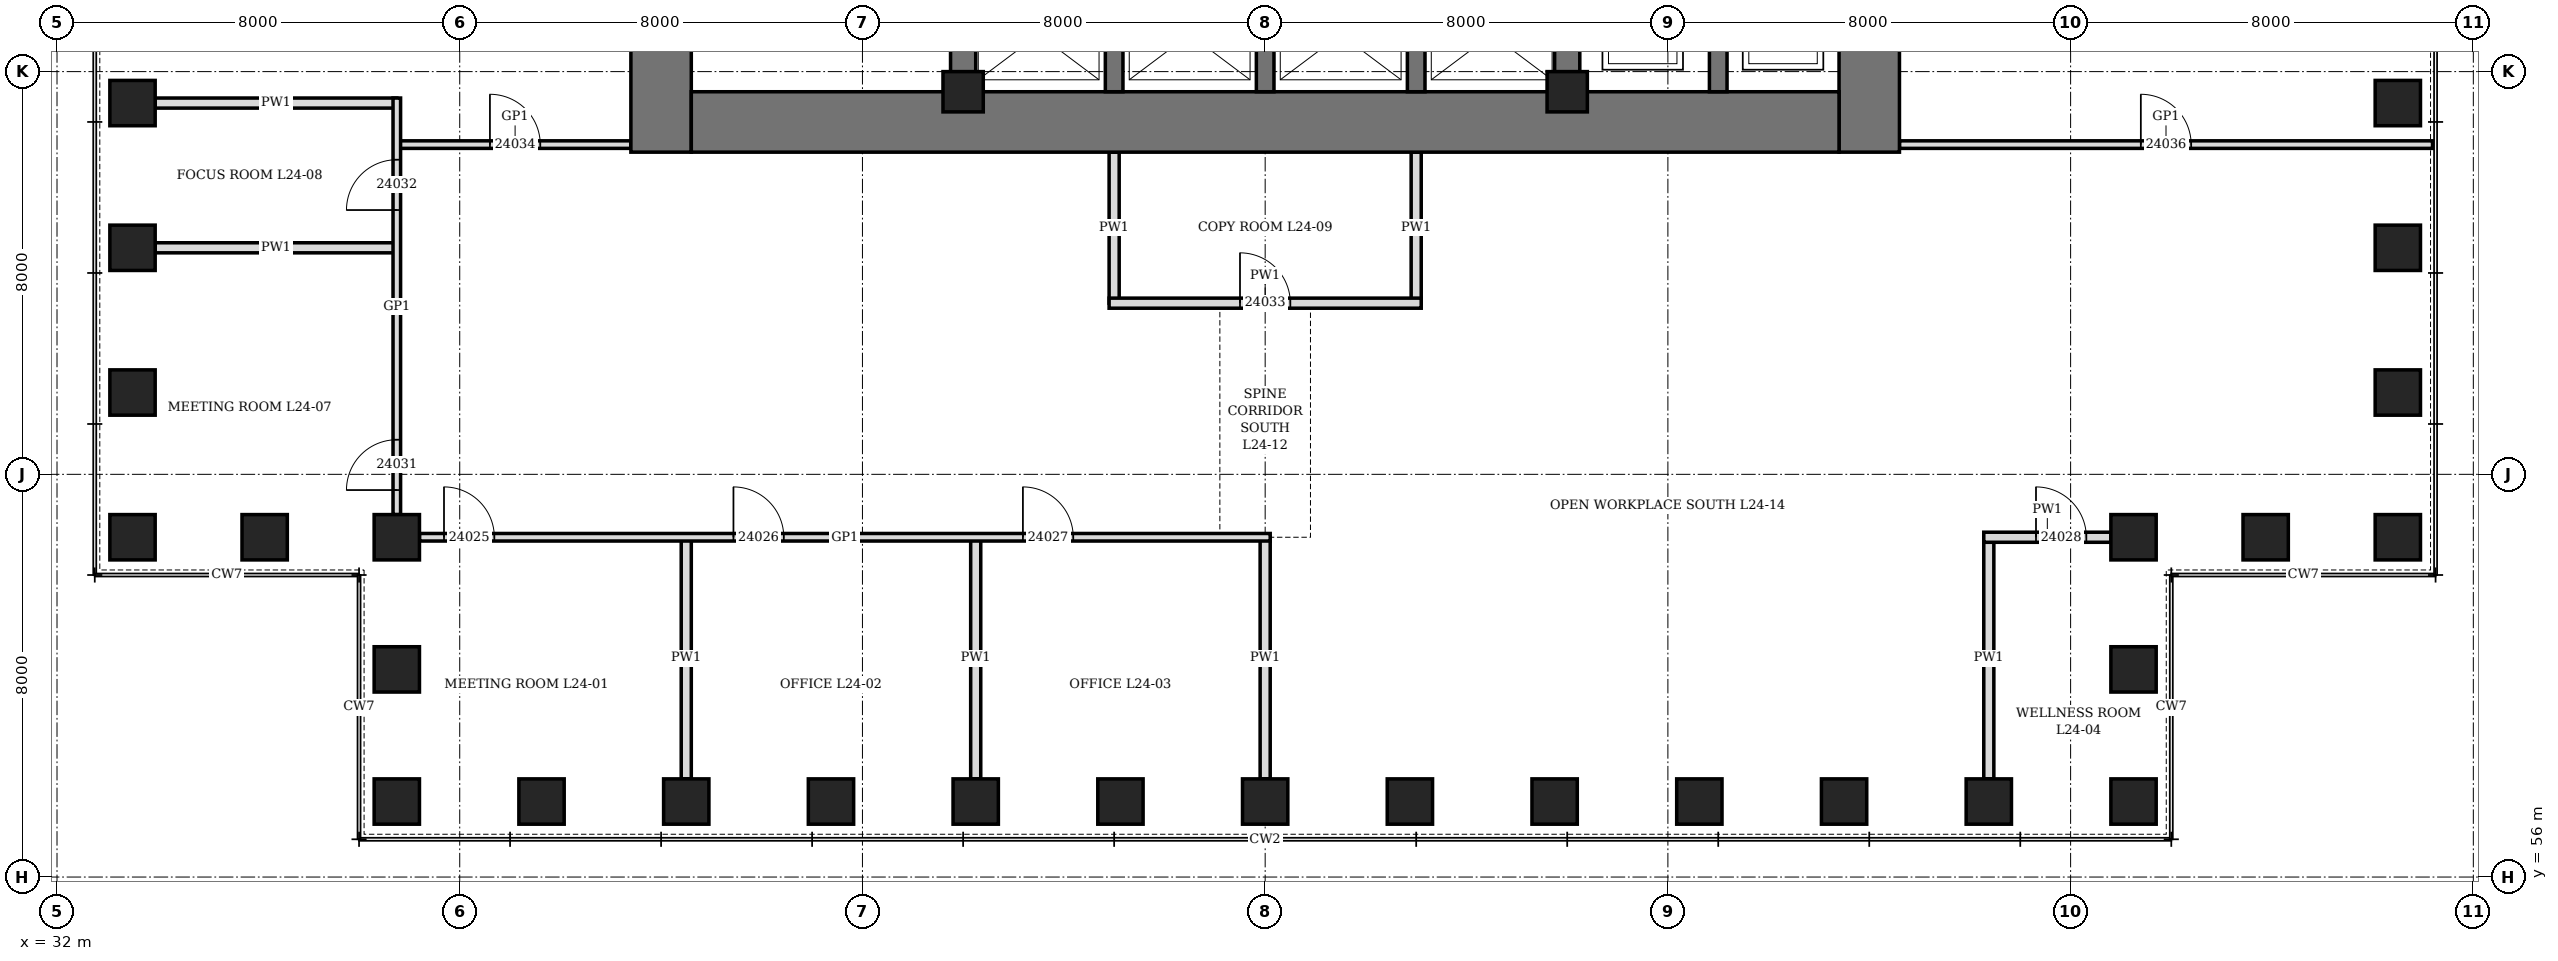
"""IFC4 building model, lengths in metres.
Left out: names, types, materials, properties, quantities, classifications, styles, units other than length and angle.
Written with IfcOpenShell. Run it as: python <this file> out.ifc"""

import sys

from ifc_helpers import new_model, si_unit, direction, frame, frame_2d, origin, origin_2d, place, context, subcontext, project, spatial, rectangle, hollow_rectangle, extrude, element, fill, save


model = new_model("IFC4")
c1 = context("Model", 3, precision=1e-05, world=origin(), true_north=direction((0.0, 1.0)))
c2 = subcontext(c1, "Body", "Model", "MODEL_VIEW")
j1 = project(units=[si_unit("LENGTHUNIT", "METRE"), si_unit("PLANEANGLEUNIT", "RADIAN")], contexts=[c1])
p1 = place(None, origin())
s1 = spatial("IfcSite", under=j1, at=p1, CompositionType="ELEMENT")
p2 = place(p1, origin())
s2 = spatial("IfcBuilding", under=s1, at=p2, CompositionType="ELEMENT")
p3 = place(p2, frame((0.0, 0.0, 112.3)))
s3 = spatial("IfcBuildingStorey", under=s2, at=p3, CompositionType="ELEMENT", Elevation=112.3)
for number, where, z_axis, x_axis in (
    (1, (38.75, 57.5, 0.0), (0.0, 0.0, 1.0), (1.0, 0.0, 0.0)),
    (2, (41.625, 57.5, 0.0), (0.0, 0.0, 1.0), (1.0, 0.0, 0.0)),
    (3, (44.5, 57.5, 0.0), (0.0, 0.0, 1.0), (1.0, 0.0, 0.0)),
    (4, (47.375, 57.5, 0.0), (0.0, 0.0, 1.0), (1.0, 0.0, 0.0)),
    (5, (50.25, 57.5, 0.0), (0.0, 0.0, 1.0), (1.0, 0.0, 0.0)),
    (6, (53.125, 57.5, 0.0), (0.0, 0.0, 1.0), (1.0, 0.0, 0.0)),
    (7, (56.0, 57.5, 0.0), (0.0, 0.0, 1.0), (1.0, 0.0, 0.0)),
    (8, (58.875, 57.5, 0.0), (0.0, 0.0, 1.0), (1.0, 0.0, 0.0)),
    (9, (61.75, 57.5, 0.0), (0.0, 0.0, 1.0), (1.0, 0.0, 0.0)),
    (10, (64.625, 57.5, 0.0), (0.0, 0.0, 1.0), (1.0, 0.0, 0.0)),
    (11, (67.5, 57.5, 0.0), (0.0, 0.0, 1.0), (1.0, 0.0, 0.0)),
    (12, (70.375, 57.5, 0.0), (0.0, 0.0, 1.0), (1.0, 0.0, 0.0)),
    (13, (73.25, 57.5, 0.0), (0.0, 0.0, 1.0), (0.0, 1.0, 0.0)),
    (14, (73.25, 60.125, 0.0), (0.0, 0.0, 1.0), (0.0, 1.0, 0.0)),
    (15, (73.25, 62.75, 0.0), (0.0, 0.0, 1.0), (1.0, 0.0, 0.0)),
    (16, (75.875, 62.75, 0.0), (0.0, 0.0, 1.0), (1.0, 0.0, 0.0)),
    (17, (78.5, 62.75, 0.0), (0.0, 0.0, 1.0), (0.0, 1.0, 0.0)),
    (18, (78.5, 65.625, 0.0), (0.0, 0.0, 1.0), (0.0, 1.0, 0.0)),
    (19, (78.5, 68.5, 0.0), (0.0, 0.0, 1.0), (0.0, 1.0, 0.0)),
    (20, (78.5, 71.375, 0.0), (0.0, 0.0, 1.0), (0.0, 1.0, 0.0)),
    (21, (33.5, 71.375, 0.0), (0.0, 0.0, 1.0), (0.0, 1.0, 0.0)),
    (22, (33.5, 68.5, 0.0), (0.0, 0.0, 1.0), (0.0, 1.0, 0.0)),
    (23, (33.5, 65.625, 0.0), (0.0, 0.0, 1.0), (0.0, 1.0, 0.0)),
    (24, (33.5, 62.75, 0.0), (0.0, 0.0, 1.0), (1.0, 0.0, 0.0)),
    (25, (36.125, 62.75, 0.0), (0.0, 0.0, 1.0), (1.0, 0.0, 0.0)),
    (26, (38.75, 62.75, 0.0), (0.0, 0.0, 1.0), (0.0, 1.0, 0.0)),
    (27, (38.75, 60.125, 0.0), (0.0, 0.0, 1.0), (0.0, 1.0, 0.0)),
):
    element("IfcColumn", number, at=place(p3, frame(where, z_axis=z_axis, x_axis=x_axis)), inside=s3, PredefinedType="COLUMN", context=c2, shape_type="SweptSolid", body=[
        extrude(hollow_rectangle(XDim=0.9, YDim=0.9, WallThickness=0.15, at=origin_2d()), origin(), (0.0, 0.0, 1.0), 4.2),
    ])
p4 = place(p3, frame((44.0, 70.4, 0.0), z_axis=(0.0, 0.0, 1.0), x_axis=(0.0, 1.0, 0.0)))
e28 = element("IfcWall", 28, at=p4, inside=s3, PredefinedType="SHEAR", context=c2, shape_type="SweptSolid", body=[
    extrude(rectangle(XDim=19.2, YDim=1.2, at=frame_2d((9.6, 0.0))), origin(), (0.0, 0.0, 1.0), 4.2),
])
p5 = place(p4, frame((8.6, 0.0, 0.0)))
e29 = element("IfcOpeningElement", 29, at=p5, cuts=e28, PredefinedType="OPENING", context=c2, shape_type="SweptSolid", body=[
    extrude(rectangle(XDim=2.0, YDim=2.4, at=frame_2d((1.0, 1.2))), frame((0.0, 0.61, 0.0), z_axis=(0.0, -1.0, 0.0), x_axis=(1.0, 0.0, 0.0)), (0.0, 0.0, 1.0), 1.22),
])
p6 = place(p3, frame((68.0, 70.4, 0.0), z_axis=(0.0, 0.0, 1.0), x_axis=(0.0, 1.0, 0.0)))
e30 = element("IfcWall", 30, at=p6, inside=s3, PredefinedType="SHEAR", context=c2, shape_type="SweptSolid", body=[
    extrude(rectangle(XDim=19.2, YDim=1.2, at=frame_2d((9.6, 0.0))), origin(), (0.0, 0.0, 1.0), 4.2),
])
p7 = place(p6, frame((8.6, 0.0, 0.0)))
e31 = element("IfcOpeningElement", 31, at=p7, cuts=e30, PredefinedType="OPENING", context=c2, shape_type="SweptSolid", body=[
    extrude(rectangle(XDim=2.0, YDim=2.4, at=frame_2d((1.0, 1.2))), frame((0.0, 0.61, 0.0), z_axis=(0.0, -1.0, 0.0), x_axis=(1.0, 0.0, 0.0)), (0.0, 0.0, 1.0), 1.22),
])
p8 = place(p3, frame((44.6, 71.0, 0.0), z_axis=(0.0, 0.0, 1.0), x_axis=(1.0, 0.0, 0.0)))
e32 = element("IfcWall", 32, at=p8, inside=s3, PredefinedType="SHEAR", context=c2, shape_type="SweptSolid", body=[
    extrude(rectangle(XDim=22.8, YDim=1.2, at=frame_2d((11.4, 0.0))), origin(), (0.0, 0.0, 1.0), 4.2),
])
p9 = place(p3, frame((50.0, 71.6, 0.0), z_axis=(0.0, 0.0, 1.0), x_axis=(0.0, 1.0, 0.0)))
e33 = element("IfcWall", 33, at=p9, inside=s3, PredefinedType="SHEAR", context=c2, shape_type="SweptSolid", body=[
    extrude(rectangle(XDim=16.8, YDim=0.5, at=frame_2d((8.4, 0.0))), origin(), (0.0, 0.0, 1.0), 4.2),
])
p10 = place(p9, frame((7.5, 0.0, 0.0)))
e34 = element("IfcOpeningElement", 34, at=p10, cuts=e33, PredefinedType="OPENING", context=c2, shape_type="SweptSolid", body=[
    extrude(rectangle(XDim=1.8, YDim=2.4, at=frame_2d((0.9, 1.2))), frame((0.0, 0.26, 0.0), z_axis=(0.0, -1.0, 0.0), x_axis=(1.0, 0.0, 0.0)), (0.0, 0.0, 1.0), 0.52),
])
p11 = place(p3, frame((62.0, 71.6, 0.0), z_axis=(0.0, 0.0, 1.0), x_axis=(0.0, 1.0, 0.0)))
e35 = element("IfcWall", 35, at=p11, inside=s3, PredefinedType="SHEAR", context=c2, shape_type="SweptSolid", body=[
    extrude(rectangle(XDim=16.8, YDim=0.5, at=frame_2d((8.4, 0.0))), origin(), (0.0, 0.0, 1.0), 4.2),
])
p12 = place(p11, frame((7.5, 0.0, 0.0)))
e36 = element("IfcOpeningElement", 36, at=p12, cuts=e35, PredefinedType="OPENING", context=c2, shape_type="SweptSolid", body=[
    extrude(rectangle(XDim=1.8, YDim=2.4, at=frame_2d((0.9, 1.2))), frame((0.0, 0.26, 0.0), z_axis=(0.0, -1.0, 0.0), x_axis=(1.0, 0.0, 0.0)), (0.0, 0.0, 1.0), 0.52),
])
for number, where, z_axis, x_axis in (
    (37, (53.0, 71.6, 0.0), (0.0, 0.0, 1.0), (0.0, 1.0, 0.0)),
    (38, (56.0, 71.6, 0.0), (0.0, 0.0, 1.0), (0.0, 1.0, 0.0)),
    (39, (59.0, 71.6, 0.0), (0.0, 0.0, 1.0), (0.0, 1.0, 0.0)),
):
    element("IfcWall", number, at=place(p3, frame(where, z_axis=z_axis, x_axis=x_axis)), inside=s3, PredefinedType="SHEAR", context=c2, shape_type="SweptSolid", body=[
        extrude(rectangle(XDim=2.225, YDim=0.35, at=frame_2d((1.112, 0.0))), origin(), (0.0, 0.0, 1.0), 4.2),
    ])
p13 = place(p3, frame((65.0, 71.6, 0.0), z_axis=(0.0, 0.0, 1.0), x_axis=(0.0, 1.0, 0.0)))
e40 = element("IfcWall", 40, at=p13, inside=s3, PredefinedType="SHEAR", context=c2, shape_type="SweptSolid", body=[
    extrude(rectangle(XDim=3.15, YDim=0.35, at=frame_2d((1.575, 0.0))), origin(), (0.0, 0.0, 1.0), 4.2),
])
for number, where, z_axis, x_axis in (
    (41, (50.0, 71.6, 0.0), (0.0, 0.0, 1.0), (1.0, 0.0, 0.0)),
    (42, (62.0, 71.6, 0.0), (0.0, 0.0, 1.0), (1.0, 0.0, 0.0)),
):
    element("IfcColumn", number, at=place(p3, frame(where, z_axis=z_axis, x_axis=x_axis)), inside=s3, PredefinedType="COLUMN", context=c2, shape_type="SweptSolid", body=[
        extrude(hollow_rectangle(XDim=0.8, YDim=0.8, WallThickness=0.1, at=origin_2d()), origin(), (0.0, 0.0, 1.0), 4.2),
    ])
p14 = place(p3, frame((44.5, 57.95, 0.0), z_axis=(0.0, 0.0, 1.0), x_axis=(0.0, 1.0, 0.0)))
e43 = element("IfcWall", 43, at=p14, inside=s3, PredefinedType="PARTITIONING", context=c2, shape_type="SweptSolid", body=[
    extrude(rectangle(XDim=4.8, YDim=0.2, at=frame_2d((2.4, 0.0))), origin(), (0.0, 0.0, 1.0), 2.74),
])
for number, where, z_axis, x_axis in (
    (44, (50.25, 57.95, 0.0), (0.0, 0.0, 1.0), (0.0, 1.0, 0.0)),
    (45, (56.0, 57.95, 0.0), (0.0, 0.0, 1.0), (0.0, 1.0, 0.0)),
):
    element("IfcWall", number, at=place(p3, frame(where, z_axis=z_axis, x_axis=x_axis)), inside=s3, PredefinedType="PARTITIONING", context=c2, shape_type="SweptSolid", body=[
        extrude(rectangle(XDim=4.8, YDim=0.2, at=frame_2d((2.4, 0.0))), origin(), (0.0, 0.0, 1.0), 3.278),
    ])
for number, where, z_axis, x_axis in (
    (46, (70.375, 57.95, 0.0), (0.0, 0.0, 1.0), (0.0, 1.0, 0.0)),
    (47, (33.95, 68.5, 0.0), (0.0, 0.0, 1.0), (1.0, 0.0, 0.0)),
    (48, (33.95, 71.375, 0.0), (0.0, 0.0, 1.0), (1.0, 0.0, 0.0)),
):
    element("IfcWall", number, at=place(p3, frame(where, z_axis=z_axis, x_axis=x_axis)), inside=s3, PredefinedType="PARTITIONING", context=c2, shape_type="SweptSolid", body=[
        extrude(rectangle(XDim=4.8, YDim=0.2, at=frame_2d((2.4, 0.0))), origin(), (0.0, 0.0, 1.0), 3.428),
    ])
for number, where, z_axis, x_axis in (
    (49, (53.0, 67.4, 0.0), (0.0, 0.0, 1.0), (0.0, 1.0, 0.0)),
    (50, (59.0, 67.4, 0.0), (0.0, 0.0, 1.0), (0.0, 1.0, 0.0)),
):
    element("IfcWall", number, at=place(p3, frame(where, z_axis=z_axis, x_axis=x_axis)), inside=s3, PredefinedType="PARTITIONING", context=c2, shape_type="SweptSolid", body=[
        extrude(rectangle(XDim=3.0, YDim=0.2, at=frame_2d((1.5, 0.0))), origin(), (0.0, 0.0, 1.0), 3.278),
    ])
p15 = place(p3, frame((39.2, 62.75, 0.0), z_axis=(0.0, 0.0, 1.0), x_axis=(1.0, 0.0, 0.0)))
e51 = element("IfcWall", 51, at=p15, inside=s3, PredefinedType="PARTITIONING", context=c2, shape_type="SweptSolid", body=[
    extrude(rectangle(XDim=16.9, YDim=0.15, at=frame_2d((8.45, 0.0))), origin(), (0.0, 0.0, 1.0), 4.04),
])
p16 = place(p15, frame((0.488, 0.0, 0.0)))
e52 = element("IfcOpeningElement", 52, at=p16, cuts=e51, PredefinedType="OPENING", context=c2, shape_type="SweptSolid", body=[
    extrude(rectangle(XDim=1.0, YDim=2.4, at=frame_2d((0.5, 1.2))), frame((0.0, 0.085, 0.0), z_axis=(0.0, -1.0, 0.0), x_axis=(1.0, 0.0, 0.0)), (0.0, 0.0, 1.0), 0.17),
])
p17 = place(p15, frame((6.238, 0.0, 0.0)))
e53 = element("IfcOpeningElement", 53, at=p17, cuts=e51, PredefinedType="OPENING", context=c2, shape_type="SweptSolid", body=[
    extrude(rectangle(XDim=1.0, YDim=2.1, at=frame_2d((0.5, 1.05))), frame((0.0, 0.085, 0.0), z_axis=(0.0, -1.0, 0.0), x_axis=(1.0, 0.0, 0.0)), (0.0, 0.0, 1.0), 0.17),
])
p18 = place(p15, frame((11.988, 0.0, 0.0)))
e54 = element("IfcOpeningElement", 54, at=p18, cuts=e51, PredefinedType="OPENING", context=c2, shape_type="SweptSolid", body=[
    extrude(rectangle(XDim=1.0, YDim=2.1, at=frame_2d((0.5, 1.05))), frame((0.0, 0.085, 0.0), z_axis=(0.0, -1.0, 0.0), x_axis=(1.0, 0.0, 0.0)), (0.0, 0.0, 1.0), 0.17),
])
p19 = place(p3, frame((70.275, 62.75, 0.0), z_axis=(0.0, 0.0, 1.0), x_axis=(1.0, 0.0, 0.0)))
e55 = element("IfcWall", 55, at=p19, inside=s3, PredefinedType="PARTITIONING", context=c2, shape_type="SweptSolid", body=[
    extrude(rectangle(XDim=2.525, YDim=0.2, at=frame_2d((1.263, 0.0))), origin(), (0.0, 0.0, 1.0), 4.04),
])
p20 = place(p19, frame((1.038, 0.0, 0.0)))
e56 = element("IfcOpeningElement", 56, at=p20, cuts=e55, PredefinedType="OPENING", context=c2, shape_type="SweptSolid", body=[
    extrude(rectangle(XDim=1.0, YDim=2.1, at=frame_2d((0.5, 1.05))), frame((0.0, 0.11, 0.0), z_axis=(0.0, -1.0, 0.0), x_axis=(1.0, 0.0, 0.0)), (0.0, 0.0, 1.0), 0.22),
])
p21 = place(p3, frame((52.9, 67.4, 0.0), z_axis=(0.0, 0.0, 1.0), x_axis=(1.0, 0.0, 0.0)))
e57 = element("IfcWall", 57, at=p21, inside=s3, PredefinedType="PARTITIONING", context=c2, shape_type="SweptSolid", body=[
    extrude(rectangle(XDim=6.2, YDim=0.2, at=frame_2d((3.1, 0.0))), origin(), (0.0, 0.0, 1.0), 4.04),
])
p22 = place(p21, frame((2.6, 0.0, 0.0)))
e58 = element("IfcOpeningElement", 58, at=p22, cuts=e57, PredefinedType="OPENING", context=c2, shape_type="SweptSolid", body=[
    extrude(rectangle(XDim=1.0, YDim=2.1, at=frame_2d((0.5, 1.05))), frame((0.0, 0.11, 0.0), z_axis=(0.0, -1.0, 0.0), x_axis=(1.0, 0.0, 0.0)), (0.0, 0.0, 1.0), 0.22),
])
p23 = place(p3, frame((38.8, 70.55, 0.0), z_axis=(0.0, 0.0, 1.0), x_axis=(1.0, 0.0, 0.0)))
e59 = element("IfcWall", 59, at=p23, inside=s3, PredefinedType="PARTITIONING", context=c2, shape_type="SweptSolid", body=[
    extrude(rectangle(XDim=4.6, YDim=0.15, at=frame_2d((2.3, 0.0))), origin(), (0.0, 0.0, 1.0), 4.04),
])
p24 = place(p23, frame((1.8, 0.0, 0.0)))
e60 = element("IfcOpeningElement", 60, at=p24, cuts=e59, PredefinedType="OPENING", context=c2, shape_type="SweptSolid", body=[
    extrude(rectangle(XDim=1.0, YDim=2.4, at=frame_2d((0.5, 1.2))), frame((0.0, 0.085, 0.0), z_axis=(0.0, -1.0, 0.0), x_axis=(1.0, 0.0, 0.0)), (0.0, 0.0, 1.0), 0.17),
])
p25 = place(p3, frame((68.6, 70.55, 0.0), z_axis=(0.0, 0.0, 1.0), x_axis=(1.0, 0.0, 0.0)))
e61 = element("IfcWall", 61, at=p25, inside=s3, PredefinedType="PARTITIONING", context=c2, shape_type="SweptSolid", body=[
    extrude(rectangle(XDim=10.59, YDim=0.15, at=frame_2d((5.295, 0.0))), origin(), (0.0, 0.0, 1.0), 4.04),
])
p26 = place(p25, frame((4.795, 0.0, 0.0)))
e62 = element("IfcOpeningElement", 62, at=p26, cuts=e61, PredefinedType="OPENING", context=c2, shape_type="SweptSolid", body=[
    extrude(rectangle(XDim=1.0, YDim=2.4, at=frame_2d((0.5, 1.2))), frame((0.0, 0.085, 0.0), z_axis=(0.0, -1.0, 0.0), x_axis=(1.0, 0.0, 0.0)), (0.0, 0.0, 1.0), 0.17),
])
p27 = place(p3, frame((38.75, 63.2, 0.0), z_axis=(0.0, 0.0, 1.0), x_axis=(0.0, 1.0, 0.0)))
e63 = element("IfcWall", 63, at=p27, inside=s3, PredefinedType="PARTITIONING", context=c2, shape_type="SweptSolid", body=[
    extrude(rectangle(XDim=8.275, YDim=0.15, at=frame_2d((4.138, 0.0))), origin(), (0.0, 0.0, 1.0), 4.04),
])
p28 = place(p27, frame((0.488, 0.0, 0.0)))
e64 = element("IfcOpeningElement", 64, at=p28, cuts=e63, PredefinedType="OPENING", context=c2, shape_type="SweptSolid", body=[
    extrude(rectangle(XDim=1.0, YDim=2.4, at=frame_2d((0.5, 1.2))), frame((0.0, 0.085, 0.0), z_axis=(0.0, -1.0, 0.0), x_axis=(1.0, 0.0, 0.0)), (0.0, 0.0, 1.0), 0.17),
])
p29 = place(p27, frame((6.05, 0.0, 0.0)))
e65 = element("IfcOpeningElement", 65, at=p29, cuts=e63, PredefinedType="OPENING", context=c2, shape_type="SweptSolid", body=[
    extrude(rectangle(XDim=1.0, YDim=2.4, at=frame_2d((0.5, 1.2))), frame((0.0, 0.085, 0.0), z_axis=(0.0, -1.0, 0.0), x_axis=(1.0, 0.0, 0.0)), (0.0, 0.0, 1.0), 0.17),
])
p30 = place(p16, origin())
e66 = element("IfcDoor", 66, at=p30, inside=s3, OperationType="SINGLE_SWING_RIGHT", PredefinedType="DOOR", context=c2, shape_type="SweptSolid", body=[
    extrude(rectangle(XDim=1.0, YDim=2.4, at=frame_2d((0.5, 1.2))), frame((0.0, 0.075, 0.0), z_axis=(0.0, -1.0, 0.0), x_axis=(1.0, 0.0, 0.0)), (0.0, 0.0, 1.0), 0.149),
])
fill(e52, e66)
p31 = place(p17, origin())
e67 = element("IfcDoor", 67, at=p31, inside=s3, OperationType="SINGLE_SWING_LEFT", PredefinedType="DOOR", context=c2, shape_type="SweptSolid", body=[
    extrude(rectangle(XDim=1.0, YDim=2.1, at=frame_2d((0.5, 1.05))), frame((0.0, 0.075, 0.0), z_axis=(0.0, -1.0, 0.0), x_axis=(1.0, 0.0, 0.0)), (0.0, 0.0, 1.0), 0.149),
])
fill(e53, e67)
p32 = place(p18, origin())
e68 = element("IfcDoor", 68, at=p32, inside=s3, OperationType="SINGLE_SWING_LEFT", PredefinedType="DOOR", context=c2, shape_type="SweptSolid", body=[
    extrude(rectangle(XDim=1.0, YDim=2.1, at=frame_2d((0.5, 1.05))), frame((0.0, 0.075, 0.0), z_axis=(0.0, -1.0, 0.0), x_axis=(1.0, 0.0, 0.0)), (0.0, 0.0, 1.0), 0.149),
])
fill(e54, e68)
p33 = place(p20, origin())
e69 = element("IfcDoor", 69, at=p33, inside=s3, OperationType="SINGLE_SWING_LEFT", PredefinedType="DOOR", context=c2, shape_type="SweptSolid", body=[
    extrude(rectangle(XDim=1.0, YDim=2.1, at=frame_2d((0.5, 1.05))), frame((0.0, 0.1, 0.0), z_axis=(0.0, -1.0, 0.0), x_axis=(1.0, 0.0, 0.0)), (0.0, 0.0, 1.0), 0.199),
])
fill(e56, e69)
p34 = place(p28, origin())
e70 = element("IfcDoor", 70, at=p34, inside=s3, OperationType="SINGLE_SWING_RIGHT", PredefinedType="DOOR", context=c2, shape_type="SweptSolid", body=[
    extrude(rectangle(XDim=1.0, YDim=2.4, at=frame_2d((0.5, 1.2))), frame((0.0, 0.075, 0.0), z_axis=(0.0, -1.0, 0.0), x_axis=(1.0, 0.0, 0.0)), (0.0, 0.0, 1.0), 0.149),
])
fill(e64, e70)
p35 = place(p29, origin())
e71 = element("IfcDoor", 71, at=p35, inside=s3, OperationType="SINGLE_SWING_RIGHT", PredefinedType="DOOR", context=c2, shape_type="SweptSolid", body=[
    extrude(rectangle(XDim=1.0, YDim=2.4, at=frame_2d((0.5, 1.2))), frame((0.0, 0.075, 0.0), z_axis=(0.0, -1.0, 0.0), x_axis=(1.0, 0.0, 0.0)), (0.0, 0.0, 1.0), 0.149),
])
fill(e65, e71)
p36 = place(p22, origin())
e72 = element("IfcDoor", 72, at=p36, inside=s3, OperationType="SINGLE_SWING_LEFT", PredefinedType="DOOR", context=c2, shape_type="SweptSolid", body=[
    extrude(rectangle(XDim=1.0, YDim=2.1, at=frame_2d((0.5, 1.05))), frame((0.0, 0.1, 0.0), z_axis=(0.0, -1.0, 0.0), x_axis=(1.0, 0.0, 0.0)), (0.0, 0.0, 1.0), 0.199),
])
fill(e58, e72)
p37 = place(p24, origin())
e73 = element("IfcDoor", 73, at=p37, inside=s3, OperationType="SINGLE_SWING_RIGHT", PredefinedType="DOOR", context=c2, shape_type="SweptSolid", body=[
    extrude(rectangle(XDim=1.0, YDim=2.4, at=frame_2d((0.5, 1.2))), frame((0.0, 0.075, 0.0), z_axis=(0.0, -1.0, 0.0), x_axis=(1.0, 0.0, 0.0)), (0.0, 0.0, 1.0), 0.149),
])
fill(e60, e73)
p38 = place(p26, origin())
e74 = element("IfcDoor", 74, at=p38, inside=s3, OperationType="SINGLE_SWING_RIGHT", PredefinedType="DOOR", context=c2, shape_type="SweptSolid", body=[
    extrude(rectangle(XDim=1.0, YDim=2.4, at=frame_2d((0.5, 1.2))), frame((0.0, 0.075, 0.0), z_axis=(0.0, -1.0, 0.0), x_axis=(1.0, 0.0, 0.0)), (0.0, 0.0, 1.0), 0.149),
])
fill(e62, e74)
save(model, sys.argv[1])
